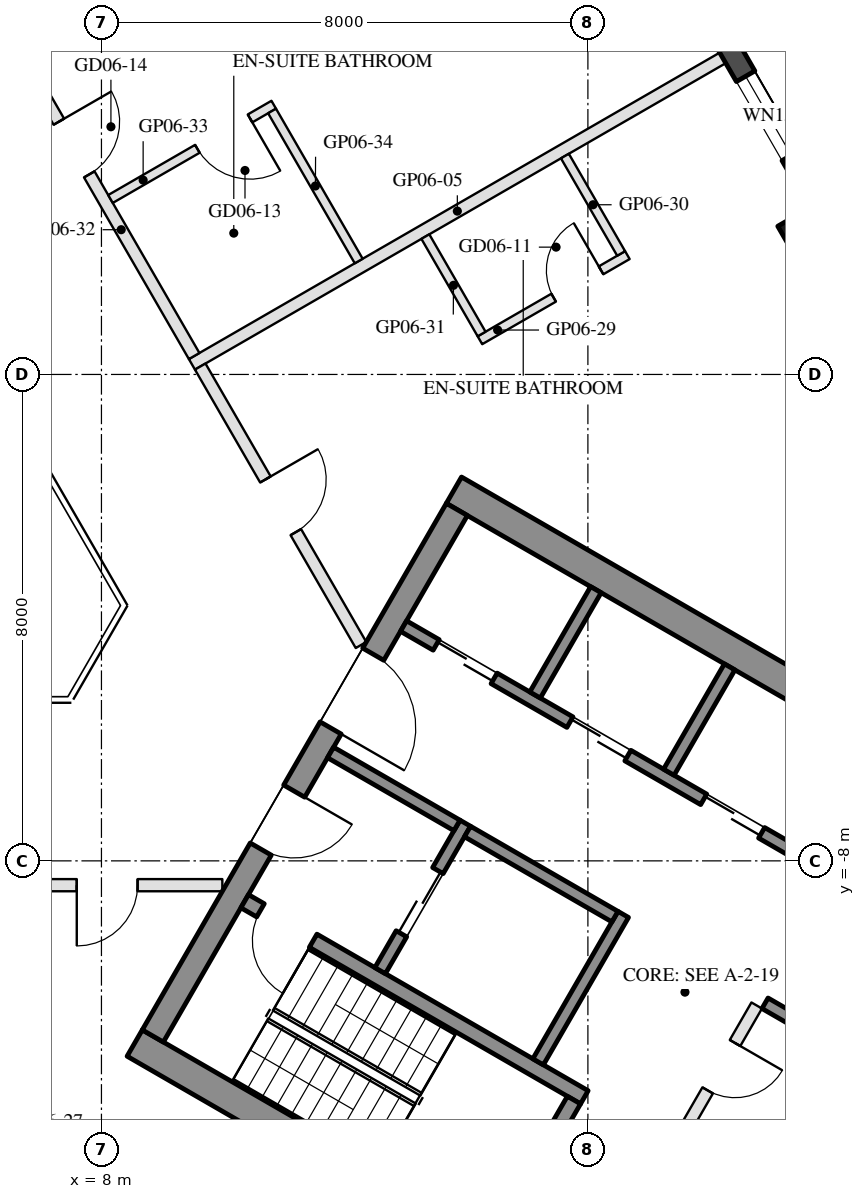
"""IFC4 building model, lengths in metres.
Left out: names, types, materials, properties, quantities, classifications, styles, units other than length and angle.
Written with IfcOpenShell. Run it as: python <this file> out.ifc"""

import sys

from ifc_helpers import new_model, si_unit, direction, frame, frame_2d, origin, origin_2d, place, context, subcontext, project, spatial, rectangle, hollow_rectangle, extrude, element, fill, save


model = new_model("IFC4")
c1 = context("Model", 3, precision=1e-05, world=origin(), true_north=direction((0.0, 1.0)))
c2 = subcontext(c1, "Body", "Model", "MODEL_VIEW")
j1 = project(units=[si_unit("LENGTHUNIT", "METRE"), si_unit("PLANEANGLEUNIT", "RADIAN")], contexts=[c1])
p1 = place(None, origin())
s1 = spatial("IfcSite", under=j1, at=p1, CompositionType="ELEMENT")
p2 = place(p1, origin())
s2 = spatial("IfcBuilding", under=s1, at=p2, CompositionType="ELEMENT")
p3 = place(p2, frame((0.0, 0.0, 90.9)))
s3 = spatial("IfcBuildingStorey", under=s2, at=p3, CompositionType="ELEMENT", Elevation=90.9)
p4 = place(p3, frame((19.738, 2.273, 0.0), z_axis=(0.0, 0.0, 1.0), x_axis=(-0.5, 0.866025403784, 0.0)))
e1 = element("IfcColumn", 1, at=p4, inside=s3, PredefinedType="COLUMN", context=c2, shape_type="SweptSolid", body=[
    extrude(hollow_rectangle(XDim=0.9, YDim=0.9, WallThickness=0.04, at=origin_2d()), origin(), (0.0, 0.0, 1.0), 3.7),
])
p5 = place(p3, frame((19.729, 2.938, 0.0), z_axis=(0.0, 0.0, 1.0), x_axis=(-0.499976430342, 0.866039011305, 0.0)))
e2 = element("IfcWall", 2, at=p5, inside=s3, PredefinedType="SOLIDWALL", context=c2, shape_type="SweptSolid", body=[
    extrude(rectangle(XDim=6.74, YDim=0.35, at=frame_2d((3.37, 0.0))), origin(), (0.0, 0.0, 1.0), 3.55),
])
p6 = place(p5, frame((0.77, 0.0, 0.3)))
e3 = element("IfcOpeningElement", 3, at=p6, cuts=e2, PredefinedType="OPENING", context=c2, shape_type="SweptSolid", body=[
    extrude(rectangle(XDim=1.5, YDim=2.65, at=frame_2d((0.75, 1.325))), frame((0.0, 0.185, 0.0), z_axis=(0.0, -1.0, 0.0), x_axis=(1.0, 0.0, 0.0)), (0.0, 0.0, 1.0), 0.37),
])
p7 = place(p5, frame((3.37, 0.0, 0.0)))
e4 = element("IfcOpeningElement", 4, at=p7, cuts=e2, PredefinedType="OPENING", context=c2, shape_type="SweptSolid", body=[
    extrude(rectangle(XDim=2.4, YDim=2.4, at=frame_2d((1.2, 1.2))), frame((0.0, 0.185, 0.0), z_axis=(0.0, -1.0, 0.0), x_axis=(1.0, 0.0, 0.0)), (0.0, 0.0, 1.0), 0.37),
])
for number, where, z_axis, x_axis in (
    (5, (8.547, -10.997, 0.0), (0.0, 0.0, 1.0), (0.866, -0.5, 0.0)),
    (6, (13.797, -1.903, 0.0), (0.0, 0.0, 1.0), (0.866, -0.5, 0.0)),
):
    element("IfcWall", number, at=place(p3, frame(where, z_axis=z_axis, x_axis=x_axis)), inside=s3, PredefinedType="SHEAR", context=c2, shape_type="SweptSolid", body=[
        extrude(rectangle(XDim=14.837, YDim=0.5, at=frame_2d((7.418, 0.0))), origin(), (0.0, 0.0, 1.0), 3.5),
    ])
p8 = place(p3, frame((8.845, -10.88, 0.0), z_axis=(0.0, 0.0, 1.0), x_axis=(0.500004234368, 0.866022959057, 0.0)))
e7 = element("IfcWall", 7, at=p8, inside=s3, PredefinedType="SHEAR", context=c2, shape_type="SweptSolid", body=[
    extrude(rectangle(XDim=10.0, YDim=0.4, at=frame_2d((5.0, 0.0))), origin(), (0.0, 0.0, 1.0), 3.5),
])
p9 = place(p8, frame((3.55, 0.0, 0.0)))
e8 = element("IfcOpeningElement", 8, at=p9, cuts=e7, PredefinedType="OPENING", context=c2, shape_type="SweptSolid", body=[
    extrude(rectangle(XDim=1.1, YDim=2.1, at=frame_2d((0.55, 1.05))), frame((0.0, 0.21, 0.0), z_axis=(0.0, -1.0, 0.0), x_axis=(1.0, 0.0, 0.0)), (0.0, 0.0, 1.0), 0.42),
])
p10 = place(p8, frame((5.85, 0.0, 0.0)))
e9 = element("IfcOpeningElement", 9, at=p10, cuts=e7, PredefinedType="OPENING", context=c2, shape_type="SweptSolid", body=[
    extrude(rectangle(XDim=1.4, YDim=2.1, at=frame_2d((0.7, 1.05))), frame((0.0, 0.21, 0.0), z_axis=(0.0, -1.0, 0.0), x_axis=(1.0, 0.0, 0.0)), (0.0, 0.0, 1.0), 0.42),
])
p11 = place(p3, frame((10.356, -8.664, 0.0), z_axis=(0.0, 0.0, 1.0), x_axis=(0.866028629588, -0.499994412703, 0.0)))
e10 = element("IfcWall", 10, at=p11, inside=s3, PredefinedType="SHEAR", context=c2, shape_type="SweptSolid", body=[
    extrude(rectangle(XDim=6.45, YDim=0.25, at=frame_2d((3.225, 0.0))), origin(), (0.0, 0.0, 1.0), 3.5),
])
p12 = place(p11, frame((0.3, 0.0, 0.0)))
e11 = element("IfcOpeningElement", 11, at=p12, cuts=e10, PredefinedType="OPENING", context=c2, shape_type="SweptSolid", body=[
    extrude(rectangle(XDim=1.0, YDim=2.1, at=frame_2d((0.5, 1.05))), frame((0.0, 0.135, 0.0), z_axis=(0.0, -1.0, 0.0), x_axis=(1.0, 0.0, 0.0)), (0.0, 0.0, 1.0), 0.27),
])
p13 = place(p3, frame((14.496, -14.143, 0.0), z_axis=(0.0, 0.0, 1.0), x_axis=(0.500062241894, 0.865989465428, 0.0)))
e12 = element("IfcWall", 12, at=p13, inside=s3, PredefinedType="SHEAR", context=c2, shape_type="SweptSolid", body=[
    extrude(rectangle(XDim=2.55, YDim=0.25, at=frame_2d((1.275, 0.0))), origin(), (0.0, 0.0, 1.0), 3.5),
])
p14 = place(p3, frame((15.181, -11.305, 0.0), z_axis=(0.0, 0.0, 1.0), x_axis=(0.49994636267, 0.866056369097, 0.0)))
e13 = element("IfcWall", 13, at=p14, inside=s3, PredefinedType="SHEAR", context=c2, shape_type="SweptSolid", body=[
    extrude(rectangle(XDim=2.8, YDim=0.2, at=frame_2d((1.4, 0.0))), origin(), (0.0, 0.0, 1.0), 3.5),
])
p15 = place(p3, frame((12.583, -9.805, 0.0), z_axis=(0.0, 0.0, 1.0), x_axis=(0.49994636267, 0.866056369097, 0.0)))
e14 = element("IfcWall", 14, at=p15, inside=s3, PredefinedType="SHEAR", context=c2, shape_type="SweptSolid", body=[
    extrude(rectangle(XDim=2.8, YDim=0.2, at=frame_2d((1.4, 0.0))), origin(), (0.0, 0.0, 1.0), 3.5),
])
p16 = place(p15, frame((0.7, 0.0, 0.0)))
e15 = element("IfcOpeningElement", 15, at=p16, cuts=e14, PredefinedType="OPENING", context=c2, shape_type="SweptSolid", body=[
    extrude(rectangle(XDim=1.2, YDim=2.1, at=frame_2d((0.6, 1.05))), frame((0.0, 0.11, 0.0), z_axis=(0.0, -1.0, 0.0), x_axis=(1.0, 0.0, 0.0)), (0.0, 0.0, 1.0), 0.22),
])
p17 = place(p3, frame((11.768, -6.217, 0.0), z_axis=(0.0, 0.0, 1.0), x_axis=(0.866050077142, -0.499957262057, 0.0)))
e16 = element("IfcWall", 16, at=p17, inside=s3, PredefinedType="SHEAR", context=c2, shape_type="SweptSolid", body=[
    extrude(rectangle(XDim=2.4, YDim=0.2, at=frame_2d((1.2, 0.0))), origin(), (0.0, 0.0, 1.0), 3.5),
])
p18 = place(p3, frame((14.02, -7.517, 0.0), z_axis=(0.0, 0.0, 1.0), x_axis=(0.866034573852, -0.49998411664, 0.0)))
e17 = element("IfcWall", 17, at=p18, inside=s3, PredefinedType="SHEAR", context=c2, shape_type="SweptSolid", body=[
    extrude(rectangle(XDim=2.8, YDim=0.2, at=frame_2d((1.4, 0.0))), origin(), (0.0, 0.0, 1.0), 3.5),
])
p19 = place(p3, frame((12.968, -4.138, 0.0), z_axis=(0.0, 0.0, 1.0), x_axis=(0.866028328073, -0.49999493495, 0.0)))
e18 = element("IfcWall", 18, at=p19, inside=s3, PredefinedType="SHEAR", context=c2, shape_type="SweptSolid", body=[
    extrude(rectangle(XDim=10.16, YDim=0.2, at=frame_2d((5.08, 0.0))), origin(), (0.0, 0.0, 1.0), 3.5),
])
p20 = place(p19, frame((0.62, 0.0, 0.0)))
e19 = element("IfcOpeningElement", 19, at=p20, cuts=e18, PredefinedType="OPENING", context=c2, shape_type="SweptSolid", body=[
    extrude(rectangle(XDim=1.1, YDim=2.1, at=frame_2d((0.55, 1.05))), frame((0.0, 0.11, 0.0), z_axis=(0.0, -1.0, 0.0), x_axis=(1.0, 0.0, 0.0)), (0.0, 0.0, 1.0), 0.22),
])
p21 = place(p19, frame((3.16, 0.0, 0.0)))
e20 = element("IfcOpeningElement", 20, at=p21, cuts=e18, PredefinedType="OPENING", context=c2, shape_type="SweptSolid", body=[
    extrude(rectangle(XDim=1.1, YDim=2.1, at=frame_2d((0.55, 1.05))), frame((0.0, 0.11, 0.0), z_axis=(0.0, -1.0, 0.0), x_axis=(1.0, 0.0, 0.0)), (0.0, 0.0, 1.0), 0.22),
])
p22 = place(p19, frame((5.7, 0.0, 0.0)))
e21 = element("IfcOpeningElement", 21, at=p22, cuts=e18, PredefinedType="OPENING", context=c2, shape_type="SweptSolid", body=[
    extrude(rectangle(XDim=1.1, YDim=2.1, at=frame_2d((0.55, 1.05))), frame((0.0, 0.11, 0.0), z_axis=(0.0, -1.0, 0.0), x_axis=(1.0, 0.0, 0.0)), (0.0, 0.0, 1.0), 0.22),
])
p23 = place(p19, frame((8.24, 0.0, 0.0)))
e22 = element("IfcOpeningElement", 22, at=p23, cuts=e18, PredefinedType="OPENING", context=c2, shape_type="SweptSolid", body=[
    extrude(rectangle(XDim=1.1, YDim=2.1, at=frame_2d((0.55, 1.05))), frame((0.0, 0.11, 0.0), z_axis=(0.0, -1.0, 0.0), x_axis=(1.0, 0.0, 0.0)), (0.0, 0.0, 1.0), 0.22),
])
p24 = place(p3, frame((18.913, -10.342, 0.0), z_axis=(0.0, 0.0, 1.0), x_axis=(0.866038183914, -0.499977863513, 0.0)))
e23 = element("IfcWall", 23, at=p24, inside=s3, PredefinedType="SHEAR", context=c2, shape_type="SweptSolid", body=[
    extrude(rectangle(XDim=1.71, YDim=0.2, at=frame_2d((0.855, 0.0))), origin(), (0.0, 0.0, 1.0), 3.5),
])
for number, where, z_axis, x_axis in (
    (24, (15.131, -5.272, 0.0), (0.0, 0.0, 1.0), (0.5, 0.866, 0.0)),
    (25, (17.331, -6.542, 0.0), (0.0, 0.0, 1.0), (0.5, 0.866, 0.0)),
):
    element("IfcWall", number, at=place(p3, frame(where, z_axis=z_axis, x_axis=x_axis)), inside=s3, PredefinedType="SHEAR", context=c2, shape_type="SweptSolid", body=[
        extrude(rectangle(XDim=2.0, YDim=0.2, at=frame_2d((1.0, 0.0))), origin(), (0.0, 0.0, 1.0), 3.5),
    ])
p25 = place(p3, frame((16.076, -15.055, 0.0), z_axis=(0.0, 0.0, 1.0), x_axis=(0.499995103361, 0.866028230842, 0.0)))
e26 = element("IfcWall", 26, at=p25, inside=s3, PredefinedType="PARTITIONING", context=c2, shape_type="SweptSolid", body=[
    extrude(rectangle(XDim=5.4, YDim=0.2, at=frame_2d((2.7, 0.0))), origin(), (0.0, 0.0, 1.0), 3.5),
])
p26 = place(p25, frame((1.913, 0.0, 0.0)))
e27 = element("IfcOpeningElement", 27, at=p26, cuts=e26, PredefinedType="OPENING", context=c2, shape_type="SweptSolid", body=[
    extrude(rectangle(XDim=0.9, YDim=2.1, at=frame_2d((0.45, 1.05))), frame((0.0, 0.11, 0.0), z_axis=(0.0, -1.0, 0.0), x_axis=(1.0, 0.0, 0.0)), (0.0, 0.0, 1.0), 0.22),
])
p27 = place(p25, frame((3.788, 0.0, 0.0)))
e28 = element("IfcOpeningElement", 28, at=p27, cuts=e26, PredefinedType="OPENING", context=c2, shape_type="SweptSolid", body=[
    extrude(rectangle(XDim=0.9, YDim=2.1, at=frame_2d((0.45, 1.05))), frame((0.0, 0.11, 0.0), z_axis=(0.0, -1.0, 0.0), x_axis=(1.0, 0.0, 0.0)), (0.0, 0.0, 1.0), 0.22),
])
p28 = place(p3, frame((18.218, 5.206, 0.0), z_axis=(0.0, 0.0, 1.0), x_axis=(-0.866022637375, -0.500004791531, 0.0)))
e29 = element("IfcWall", 29, at=p28, inside=s3, PredefinedType="PARTITIONING", context=c2, shape_type="SweptSolid", body=[
    extrude(rectangle(XDim=10.08, YDim=0.2, at=frame_2d((5.04, 0.0))), origin(), (0.0, 0.0, 1.0), 2.96),
])
p29 = place(p3, frame((9.988, -8.4, 0.0), z_axis=(0.0, 0.0, 1.0), x_axis=(-1.0, 0.0, 0.0)))
e30 = element("IfcWall", 30, at=p29, inside=s3, PredefinedType="PARTITIONING", context=c2, shape_type="SweptSolid", body=[
    extrude(rectangle(XDim=3.788, YDim=0.2, at=frame_2d((1.894, 0.0))), origin(), (0.0, 0.0, 1.0), 2.95),
])
p30 = place(p29, frame((1.394, 0.0, 0.0)))
e31 = element("IfcOpeningElement", 31, at=p30, cuts=e30, PredefinedType="OPENING", context=c2, shape_type="SweptSolid", body=[
    extrude(rectangle(XDim=1.0, YDim=2.1, at=frame_2d((0.5, 1.05))), frame((0.0, 0.11, 0.0), z_axis=(0.0, -1.0, 0.0), x_axis=(1.0, 0.0, 0.0)), (0.0, 0.0, 1.0), 0.22),
])
p31 = place(p3, frame((9.625, 0.13, 0.0), z_axis=(0.0, 0.0, 1.0), x_axis=(0.500036828865, -0.866004139585, 0.0)))
e32 = element("IfcWall", 32, at=p31, inside=s3, PredefinedType="PARTITIONING", context=c2, shape_type="SweptSolid", body=[
    extrude(rectangle(XDim=5.288, YDim=0.2, at=frame_2d((2.644, 0.0))), origin(), (0.0, 0.0, 1.0), 2.95),
])
p32 = place(p31, frame((2.144, 0.0, 0.0)))
e33 = element("IfcOpeningElement", 33, at=p32, cuts=e32, PredefinedType="OPENING", context=c2, shape_type="SweptSolid", body=[
    extrude(rectangle(XDim=1.0, YDim=2.1, at=frame_2d((0.5, 1.05))), frame((0.0, 0.11, 0.0), z_axis=(0.0, -1.0, 0.0), x_axis=(1.0, 0.0, 0.0)), (0.0, 0.0, 1.0), 0.22),
])
p33 = place(p3, frame((14.224, 0.562, 0.0), z_axis=(0.0, 0.0, 1.0), x_axis=(0.866018616679, 0.500011755427, 0.0)))
e34 = element("IfcWall", 34, at=p33, inside=s3, PredefinedType="PARTITIONING", context=c2, shape_type="SweptSolid", body=[
    extrude(rectangle(XDim=2.8, YDim=0.15, at=frame_2d((1.4, 0.0))), origin(), (0.0, 0.0, 1.0), 3.55),
])
p34 = place(p33, frame((1.4, 0.0, 0.0)))
e35 = element("IfcOpeningElement", 35, at=p34, cuts=e34, PredefinedType="OPENING", context=c2, shape_type="SweptSolid", body=[
    extrude(rectangle(XDim=0.9, YDim=2.1, at=frame_2d((0.45, 1.05))), frame((0.0, 0.085, 0.0), z_axis=(0.0, -1.0, 0.0), x_axis=(1.0, 0.0, 0.0)), (0.0, 0.0, 1.0), 0.17),
])
p35 = place(p3, frame((16.547, 1.99, 0.0), z_axis=(0.0, 0.0, 1.0), x_axis=(-0.499985172903, 0.866033964044, 0.0)))
e36 = element("IfcWall", 36, at=p35, inside=s3, PredefinedType="PARTITIONING", context=c2, shape_type="SweptSolid", body=[
    extrude(rectangle(XDim=1.85, YDim=0.15, at=frame_2d((0.925, 0.0))), origin(), (0.0, 0.0, 1.0), 3.55),
])
p36 = place(p3, frame((14.252, 0.665, 0.0), z_axis=(0.0, 0.0, 1.0), x_axis=(-0.500042316284, 0.866000971088, 0.0)))
e37 = element("IfcWall", 37, at=p36, inside=s3, PredefinedType="PARTITIONING", context=c2, shape_type="SweptSolid", body=[
    extrude(rectangle(XDim=1.85, YDim=0.15, at=frame_2d((0.925, 0.0))), origin(), (0.0, 0.0, 1.0), 3.55),
])
p37 = place(p3, frame((6.526, 5.497, 0.0), z_axis=(0.0, 0.0, 1.0), x_axis=(0.500026652407, -0.866010015463, 0.0)))
e38 = element("IfcWall", 38, at=p37, inside=s3, PredefinedType="PARTITIONING", context=c2, shape_type="SweptSolid", body=[
    extrude(rectangle(XDim=5.998, YDim=0.2, at=frame_2d((2.999, 0.0))), origin(), (0.0, 0.0, 1.0), 2.95),
])
p38 = place(p37, frame((1.548, 0.0, 0.0)))
e39 = element("IfcOpeningElement", 39, at=p38, cuts=e38, PredefinedType="OPENING", context=c2, shape_type="SweptSolid", body=[
    extrude(rectangle(XDim=1.0, YDim=2.1, at=frame_2d((0.5, 1.05))), frame((0.0, 0.11, 0.0), z_axis=(0.0, -1.0, 0.0), x_axis=(1.0, 0.0, 0.0)), (0.0, 0.0, 1.0), 0.22),
])
p39 = place(p3, frame((10.833, 4.436, 0.0), z_axis=(0.0, 0.0, 1.0), x_axis=(-0.86602952684, -0.49999285859, 0.0)))
e40 = element("IfcWall", 40, at=p39, inside=s3, PredefinedType="PARTITIONING", context=c2, shape_type="SweptSolid", body=[
    extrude(rectangle(XDim=3.1, YDim=0.15, at=frame_2d((1.55, 0.0))), origin(), (0.0, 0.0, 1.0), 3.55),
])
p40 = place(p39, frame((0.45, 0.0, 0.0)))
e41 = element("IfcOpeningElement", 41, at=p40, cuts=e40, PredefinedType="OPENING", context=c2, shape_type="SweptSolid", body=[
    extrude(rectangle(XDim=1.0, YDim=2.1, at=frame_2d((0.5, 1.05))), frame((0.0, 0.085, 0.0), z_axis=(0.0, -1.0, 0.0), x_axis=(1.0, 0.0, 0.0)), (0.0, 0.0, 1.0), 0.17),
])
p41 = place(p3, frame((12.231, 1.865, 0.0), z_axis=(0.0, 0.0, 1.0), x_axis=(-0.500036373335, 0.866004402611, 0.0)))
e42 = element("IfcWall", 42, at=p41, inside=s3, PredefinedType="PARTITIONING", context=c2, shape_type="SweptSolid", body=[
    extrude(rectangle(XDim=2.85, YDim=0.15, at=frame_2d((1.425, 0.0))), origin(), (0.0, 0.0, 1.0), 2.95),
])
p42 = place(p6, origin())
e43 = element("IfcWindow", 43, at=p42, inside=s3, PartitioningType="SINGLE_PANEL", PredefinedType="WINDOW", context=c2, shape_type="SweptSolid", body=[
    extrude(rectangle(XDim=1.5, YDim=2.65, at=frame_2d((0.75, 1.325))), frame((0.0, 0.03, 0.0), z_axis=(0.0, -1.0, 0.0), x_axis=(1.0, 0.0, 0.0)), (0.0, 0.0, 1.0), 0.06),
])
fill(e3, e43)
p43 = place(p16, origin())
e44 = element("IfcDoor", 44, at=p43, inside=s3, OperationType="DOUBLE_DOOR_SLIDING", PredefinedType="DOOR", context=c2, shape_type="SweptSolid", body=[
    extrude(rectangle(XDim=1.2, YDim=2.1, at=frame_2d((0.6, 1.05))), frame((0.0, 0.025, 0.0), z_axis=(0.0, -1.0, 0.0), x_axis=(1.0, 0.0, 0.0)), (0.0, 0.0, 1.0), 0.05),
])
fill(e15, e44)
p44 = place(p20, origin())
e45 = element("IfcDoor", 45, at=p44, inside=s3, OperationType="DOUBLE_DOOR_SLIDING", PredefinedType="DOOR", context=c2, shape_type="SweptSolid", body=[
    extrude(rectangle(XDim=1.1, YDim=2.1, at=frame_2d((0.55, 1.05))), frame((0.0, 0.025, 0.0), z_axis=(0.0, -1.0, 0.0), x_axis=(1.0, 0.0, 0.0)), (0.0, 0.0, 1.0), 0.05),
])
fill(e19, e45)
p45 = place(p21, origin())
e46 = element("IfcDoor", 46, at=p45, inside=s3, OperationType="DOUBLE_DOOR_SLIDING", PredefinedType="DOOR", context=c2, shape_type="SweptSolid", body=[
    extrude(rectangle(XDim=1.1, YDim=2.1, at=frame_2d((0.55, 1.05))), frame((0.0, 0.025, 0.0), z_axis=(0.0, -1.0, 0.0), x_axis=(1.0, 0.0, 0.0)), (0.0, 0.0, 1.0), 0.05),
])
fill(e20, e46)
p46 = place(p22, origin())
e47 = element("IfcDoor", 47, at=p46, inside=s3, OperationType="DOUBLE_DOOR_SLIDING", PredefinedType="DOOR", context=c2, shape_type="SweptSolid", body=[
    extrude(rectangle(XDim=1.1, YDim=2.1, at=frame_2d((0.55, 1.05))), frame((0.0, 0.025, 0.0), z_axis=(0.0, -1.0, 0.0), x_axis=(1.0, 0.0, 0.0)), (0.0, 0.0, 1.0), 0.05),
])
fill(e21, e47)
p47 = place(p27, frame((0.9, 0.0, 0.0), z_axis=(0.0, 0.0, 1.0), x_axis=(-1.0, 0.0, 0.0)))
e48 = element("IfcDoor", 48, at=p47, inside=s3, OperationType="SINGLE_SWING_LEFT", PredefinedType="DOOR", context=c2, shape_type="SweptSolid", body=[
    extrude(rectangle(XDim=0.9, YDim=2.1, at=frame_2d((0.45, 1.05))), frame((0.0, 0.025, 0.0), z_axis=(0.0, -1.0, 0.0), x_axis=(1.0, 0.0, 0.0)), (0.0, 0.0, 1.0), 0.05),
])
fill(e28, e48)
p48 = place(p9, frame((1.1, 0.0, 0.0), z_axis=(0.0, 0.0, 1.0), x_axis=(-1.0, 0.0, 0.0)))
e49 = element("IfcDoor", 49, at=p48, inside=s3, OperationType="SINGLE_SWING_LEFT", PredefinedType="DOOR", context=c2, shape_type="SweptSolid", body=[
    extrude(rectangle(XDim=1.1, YDim=2.1, at=frame_2d((0.55, 1.05))), frame((0.0, 0.025, 0.0), z_axis=(0.0, -1.0, 0.0), x_axis=(1.0, 0.0, 0.0)), (0.0, 0.0, 1.0), 0.05),
])
fill(e8, e49)
p49 = place(p10, frame((1.4, 0.0, 0.0), z_axis=(0.0, 0.0, 1.0), x_axis=(-1.0, 0.0, 0.0)))
e50 = element("IfcDoor", 50, at=p49, inside=s3, OperationType="DOUBLE_DOOR_SINGLE_SWING", PredefinedType="DOOR", context=c2, shape_type="SweptSolid", body=[
    extrude(rectangle(XDim=1.4, YDim=2.1, at=frame_2d((0.7, 1.05))), frame((0.0, 0.025, 0.0), z_axis=(0.0, -1.0, 0.0), x_axis=(1.0, 0.0, 0.0)), (0.0, 0.0, 1.0), 0.05),
])
fill(e9, e50)
p50 = place(p12, frame((1.0, 0.0, 0.0), z_axis=(0.0, 0.0, 1.0), x_axis=(-1.0, 0.0, 0.0)))
e51 = element("IfcDoor", 51, at=p50, inside=s3, OperationType="SINGLE_SWING_LEFT", PredefinedType="DOOR", context=c2, shape_type="SweptSolid", body=[
    extrude(rectangle(XDim=1.0, YDim=2.1, at=frame_2d((0.5, 1.05))), frame((0.0, 0.025, 0.0), z_axis=(0.0, -1.0, 0.0), x_axis=(1.0, 0.0, 0.0)), (0.0, 0.0, 1.0), 0.05),
])
fill(e11, e51)
p51 = place(p30, origin())
e52 = element("IfcDoor", 52, at=p51, inside=s3, OperationType="SINGLE_SWING_RIGHT", PredefinedType="DOOR", context=c2, shape_type="SweptSolid", body=[
    extrude(rectangle(XDim=1.0, YDim=2.1, at=frame_2d((0.5, 1.05))), frame((0.0, 0.025, 0.0), z_axis=(0.0, -1.0, 0.0), x_axis=(1.0, 0.0, 0.0)), (0.0, 0.0, 1.0), 0.05),
])
fill(e31, e52)
p52 = place(p34, origin())
e53 = element("IfcDoor", 53, at=p52, inside=s3, OperationType="SINGLE_SWING_RIGHT", PredefinedType="DOOR", context=c2, shape_type="SweptSolid", body=[
    extrude(rectangle(XDim=0.9, YDim=2.1, at=frame_2d((0.45, 1.05))), frame((0.0, 0.025, 0.0), z_axis=(0.0, -1.0, 0.0), x_axis=(1.0, 0.0, 0.0)), (0.0, 0.0, 1.0), 0.05),
])
fill(e35, e53)
p53 = place(p32, origin())
e54 = element("IfcDoor", 54, at=p53, inside=s3, OperationType="SINGLE_SWING_LEFT", PredefinedType="DOOR", context=c2, shape_type="SweptSolid", body=[
    extrude(rectangle(XDim=1.0, YDim=2.1, at=frame_2d((0.5, 1.05))), frame((0.0, 0.025, 0.0), z_axis=(0.0, -1.0, 0.0), x_axis=(1.0, 0.0, 0.0)), (0.0, 0.0, 1.0), 0.05),
])
fill(e33, e54)
p54 = place(p40, origin())
e55 = element("IfcDoor", 55, at=p54, inside=s3, OperationType="SINGLE_SWING_LEFT", PredefinedType="DOOR", context=c2, shape_type="SweptSolid", body=[
    extrude(rectangle(XDim=1.0, YDim=2.1, at=frame_2d((0.5, 1.05))), frame((0.0, 0.025, 0.0), z_axis=(0.0, -1.0, 0.0), x_axis=(1.0, 0.0, 0.0)), (0.0, 0.0, 1.0), 0.05),
])
fill(e41, e55)
p55 = place(p38, origin())
e56 = element("IfcDoor", 56, at=p55, inside=s3, OperationType="SINGLE_SWING_LEFT", PredefinedType="DOOR", context=c2, shape_type="SweptSolid", body=[
    extrude(rectangle(XDim=1.0, YDim=2.1, at=frame_2d((0.5, 1.05))), frame((0.0, 0.025, 0.0), z_axis=(0.0, -1.0, 0.0), x_axis=(1.0, 0.0, 0.0)), (0.0, 0.0, 1.0), 0.05),
])
fill(e39, e56)
save(model, sys.argv[1])
